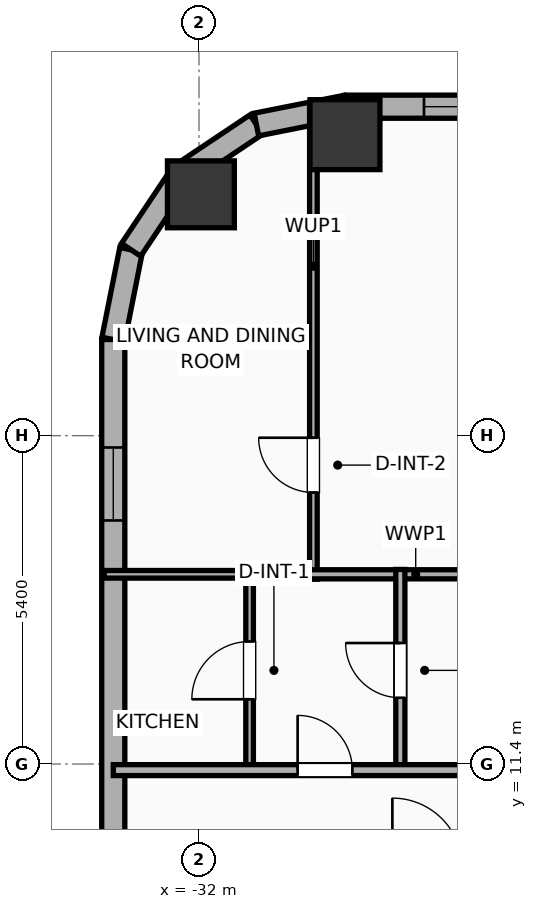
"""IFC4 building model, lengths in metres.
Left out: names, types, materials, properties, quantities, classifications, styles, units other than length and angle.
Written with IfcOpenShell. Run it as: python <this file> out.ifc"""

import sys

from ifc_helpers import new_model, si_unit, direction, frame, frame_2d, origin, origin_2d, place, context, subcontext, project, spatial, rectangle, hollow_rectangle, hollow_circle, extrude, element, fill, save


model = new_model("IFC4")
c1 = context("Model", 3, precision=1e-05, world=origin(), true_north=direction((0.0, 1.0)))
c2 = subcontext(c1, "Body", "Model", "MODEL_VIEW")
j1 = project(units=[si_unit("LENGTHUNIT", "METRE"), si_unit("PLANEANGLEUNIT", "RADIAN")], contexts=[c1])
p1 = place(None, origin())
s1 = spatial("IfcSite", under=j1, at=p1, CompositionType="ELEMENT")
p2 = place(p1, origin())
s2 = spatial("IfcBuilding", under=s1, at=p2, CompositionType="ELEMENT")
p3 = place(p2, frame((0.0, 0.0, 49.4)))
s3 = spatial("IfcBuildingStorey", under=s2, at=p3, CompositionType="ELEMENT", Elevation=49.4)
p4 = place(p3, frame((-29.6, 21.75, 0.0), z_axis=(0.0, 0.0, 1.0), x_axis=(1.0, 0.0, 0.0)))
e1 = element("IfcColumn", 1, at=p4, inside=s3, PredefinedType="COLUMN", context=c2, shape_type="SweptSolid", body=[
    extrude(hollow_rectangle(XDim=1.15, YDim=1.15, WallThickness=0.04, at=origin_2d()), origin(), (0.0, 0.0, 1.0), 3.9),
])
p5 = place(p3, frame((-31.969, 20.769, 0.0), z_axis=(0.0, 0.0, 1.0), x_axis=(1.0, 0.0, 0.0)))
e2 = element("IfcColumn", 2, at=p5, inside=s3, PredefinedType="COLUMN", context=c2, shape_type="SweptSolid", body=[
    extrude(hollow_circle(Radius=0.55, WallThickness=0.036, at=origin_2d()), origin(), (0.0, 0.0, 1.0), 3.9),
])
p6 = place(p3, frame((-33.41, -18.381, 0.0), z_axis=(0.0, 0.0, 1.0), x_axis=(0.0, 1.0, 0.0)))
e3 = element("IfcWall", 3, at=p6, inside=s3, PredefinedType="ELEMENTEDWALL", context=c2, shape_type="SweptSolid", body=[
    extrude(rectangle(XDim=36.763, YDim=0.38, at=frame_2d((18.381, 0.0))), origin(), (0.0, 0.0, 1.0), 3.65),
])
p7 = place(p6, frame((33.787, 0.0, 0.75)))
e4 = element("IfcOpeningElement", 4, at=p7, cuts=e3, PredefinedType="OPENING", context=c2, shape_type="SweptSolid", body=[
    extrude(rectangle(XDim=1.2, YDim=2.05, at=frame_2d((0.6, 1.025))), frame((0.0, 0.2, 0.0), z_axis=(0.0, -1.0, 0.0), x_axis=(1.0, 0.0, 0.0)), (0.0, 0.0, 1.0), 0.4),
])
p8 = place(p6, frame((22.726, 0.0, 0.75)))
e5 = element("IfcOpeningElement", 5, at=p8, cuts=e3, PredefinedType="OPENING", context=c2, shape_type="SweptSolid", body=[
    extrude(rectangle(XDim=1.2, YDim=2.05, at=frame_2d((0.6, 1.025))), frame((0.0, 0.2, 0.0), z_axis=(0.0, -1.0, 0.0), x_axis=(1.0, 0.0, 0.0)), (0.0, 0.0, 1.0), 0.4),
])
p9 = place(p6, frame((12.976, 0.0, 0.75)))
e6 = element("IfcOpeningElement", 6, at=p9, cuts=e3, PredefinedType="OPENING", context=c2, shape_type="SweptSolid", body=[
    extrude(rectangle(XDim=1.2, YDim=2.05, at=frame_2d((0.6, 1.025))), frame((0.0, 0.2, 0.0), z_axis=(0.0, -1.0, 0.0), x_axis=(1.0, 0.0, 0.0)), (0.0, 0.0, 1.0), 0.4),
])
p10 = place(p3, frame((-33.41, 18.381, 0.0), z_axis=(0.0, 0.0, 1.0), x_axis=(0.195086038585, 0.980786132421, 0.0)))
e7 = element("IfcWall", 7, at=p10, inside=s3, PredefinedType="ELEMENTEDWALL", context=c2, shape_type="SweptSolid", body=[
    extrude(rectangle(XDim=1.504, YDim=0.38, at=frame_2d((0.752, 0.0))), origin(), (0.0, 0.0, 1.0), 3.65),
])
p11 = place(p3, frame((-33.116, 19.857, 0.0), z_axis=(0.0, 0.0, 1.0), x_axis=(0.555572577804, 0.831468045563, 0.0)))
e8 = element("IfcWall", 8, at=p11, inside=s3, PredefinedType="ELEMENTEDWALL", context=c2, shape_type="SweptSolid", body=[
    extrude(rectangle(XDim=1.485, YDim=0.38, at=frame_2d((0.742, 0.0))), origin(), (0.0, 0.0, 1.0), 3.65),
])
p12 = place(p3, frame((-32.292, 21.091, 0.0), z_axis=(0.0, 0.0, 1.0), x_axis=(0.831442848281, 0.555610286119, 0.0)))
e9 = element("IfcWall", 9, at=p12, inside=s3, PredefinedType="ELEMENTEDWALL", context=c2, shape_type="SweptSolid", body=[
    extrude(rectangle(XDim=1.485, YDim=0.38, at=frame_2d((0.743, 0.0))), origin(), (0.0, 0.0, 1.0), 3.65),
])
p13 = place(p3, frame((-31.057, 21.917, 0.0), z_axis=(0.0, 0.0, 1.0), x_axis=(0.980786132421, 0.195086038585, 0.0)))
e10 = element("IfcWall", 10, at=p13, inside=s3, PredefinedType="ELEMENTEDWALL", context=c2, shape_type="SweptSolid", body=[
    extrude(rectangle(XDim=1.504, YDim=0.38, at=frame_2d((0.752, 0.0))), origin(), (0.0, 0.0, 1.0), 3.65),
])
p14 = place(p3, frame((-29.581, 22.21, 0.0), z_axis=(0.0, 0.0, 1.0), x_axis=(1.0, 0.0, 0.0)))
e11 = element("IfcWall", 11, at=p14, inside=s3, PredefinedType="ELEMENTEDWALL", context=c2, shape_type="SweptSolid", body=[
    extrude(rectangle(XDim=51.963, YDim=0.38, at=frame_2d((25.981, 0.0))), origin(), (0.0, 0.0, 1.0), 3.65),
])
p15 = place(p14, frame((6.61, 0.0, 0.75)))
e12 = element("IfcOpeningElement", 12, at=p15, cuts=e11, PredefinedType="OPENING", context=c2, shape_type="SweptSolid", body=[
    extrude(rectangle(XDim=2.4, YDim=2.1, at=frame_2d((1.2, 1.05))), frame((0.0, 0.2, 0.0), z_axis=(0.0, -1.0, 0.0), x_axis=(1.0, 0.0, 0.0)), (0.0, 0.0, 1.0), 0.4),
])
p16 = place(p14, frame((26.431, 0.0, 0.75)))
e13 = element("IfcOpeningElement", 13, at=p16, cuts=e11, PredefinedType="OPENING", context=c2, shape_type="SweptSolid", body=[
    extrude(rectangle(XDim=2.4, YDim=2.1, at=frame_2d((1.2, 1.05))), frame((0.0, 0.2, 0.0), z_axis=(0.0, -1.0, 0.0), x_axis=(1.0, 0.0, 0.0)), (0.0, 0.0, 1.0), 0.4),
])
p17 = place(p14, frame((43.752, 0.0, 0.75)))
e14 = element("IfcOpeningElement", 14, at=p17, cuts=e11, PredefinedType="OPENING", context=c2, shape_type="SweptSolid", body=[
    extrude(rectangle(XDim=2.4, YDim=2.1, at=frame_2d((1.2, 1.05))), frame((0.0, 0.2, 0.0), z_axis=(0.0, -1.0, 0.0), x_axis=(1.0, 0.0, 0.0)), (0.0, 0.0, 1.0), 0.4),
])
p18 = place(p14, frame((1.281, 0.0, 0.75)))
e15 = element("IfcOpeningElement", 15, at=p18, cuts=e11, PredefinedType="OPENING", context=c2, shape_type="SweptSolid", body=[
    extrude(rectangle(XDim=1.2, YDim=2.05, at=frame_2d((0.6, 1.025))), frame((0.0, 0.2, 0.0), z_axis=(0.0, -1.0, 0.0), x_axis=(1.0, 0.0, 0.0)), (0.0, 0.0, 1.0), 0.4),
])
p19 = place(p14, frame((3.922, 0.0, 0.75)))
e16 = element("IfcOpeningElement", 16, at=p19, cuts=e11, PredefinedType="OPENING", context=c2, shape_type="SweptSolid", body=[
    extrude(rectangle(XDim=1.2, YDim=2.05, at=frame_2d((0.6, 1.025))), frame((0.0, 0.2, 0.0), z_axis=(0.0, -1.0, 0.0), x_axis=(1.0, 0.0, 0.0)), (0.0, 0.0, 1.0), 0.4),
])
p20 = place(p14, frame((12.231, 0.0, 0.75)))
e17 = element("IfcOpeningElement", 17, at=p20, cuts=e11, PredefinedType="OPENING", context=c2, shape_type="SweptSolid", body=[
    extrude(rectangle(XDim=1.2, YDim=2.05, at=frame_2d((0.6, 1.025))), frame((0.0, 0.2, 0.0), z_axis=(0.0, -1.0, 0.0), x_axis=(1.0, 0.0, 0.0)), (0.0, 0.0, 1.0), 0.4),
])
p21 = place(p14, frame((18.805, 0.0, 0.75)))
e18 = element("IfcOpeningElement", 18, at=p21, cuts=e11, PredefinedType="OPENING", context=c2, shape_type="SweptSolid", body=[
    extrude(rectangle(XDim=1.2, YDim=2.05, at=frame_2d((0.6, 1.025))), frame((0.0, 0.2, 0.0), z_axis=(0.0, -1.0, 0.0), x_axis=(1.0, 0.0, 0.0)), (0.0, 0.0, 1.0), 0.4),
])
p22 = place(p14, frame((16.755, 0.0, 0.75)))
e19 = element("IfcOpeningElement", 19, at=p22, cuts=e11, PredefinedType="OPENING", context=c2, shape_type="SweptSolid", body=[
    extrude(rectangle(XDim=1.2, YDim=2.05, at=frame_2d((0.6, 1.025))), frame((0.0, 0.2, 0.0), z_axis=(0.0, -1.0, 0.0), x_axis=(1.0, 0.0, 0.0)), (0.0, 0.0, 1.0), 0.4),
])
p23 = place(p14, frame((23.776, 0.0, 0.75)))
e20 = element("IfcOpeningElement", 20, at=p23, cuts=e11, PredefinedType="OPENING", context=c2, shape_type="SweptSolid", body=[
    extrude(rectangle(XDim=1.2, YDim=2.05, at=frame_2d((0.6, 1.025))), frame((0.0, 0.2, 0.0), z_axis=(0.0, -1.0, 0.0), x_axis=(1.0, 0.0, 0.0)), (0.0, 0.0, 1.0), 0.4),
])
p24 = place(p14, frame((32.031, 0.0, 0.75)))
e21 = element("IfcOpeningElement", 21, at=p24, cuts=e11, PredefinedType="OPENING", context=c2, shape_type="SweptSolid", body=[
    extrude(rectangle(XDim=0.85, YDim=2.05, at=frame_2d((0.425, 1.025))), frame((0.0, 0.2, 0.0), z_axis=(0.0, -1.0, 0.0), x_axis=(1.0, 0.0, 0.0)), (0.0, 0.0, 1.0), 0.4),
])
p25 = place(p14, frame((34.276, 0.0, 0.75)))
e22 = element("IfcOpeningElement", 22, at=p25, cuts=e11, PredefinedType="OPENING", context=c2, shape_type="SweptSolid", body=[
    extrude(rectangle(XDim=1.2, YDim=2.05, at=frame_2d((0.6, 1.025))), frame((0.0, 0.2, 0.0), z_axis=(0.0, -1.0, 0.0), x_axis=(1.0, 0.0, 0.0)), (0.0, 0.0, 1.0), 0.4),
])
p26 = place(p14, frame((39.231, 0.0, 0.75)))
e23 = element("IfcOpeningElement", 23, at=p26, cuts=e11, PredefinedType="OPENING", context=c2, shape_type="SweptSolid", body=[
    extrude(rectangle(XDim=1.2, YDim=2.05, at=frame_2d((0.6, 1.025))), frame((0.0, 0.2, 0.0), z_axis=(0.0, -1.0, 0.0), x_axis=(1.0, 0.0, 0.0)), (0.0, 0.0, 1.0), 0.4),
])
p27 = place(p14, frame((47.676, 0.0, 0.75)))
e24 = element("IfcOpeningElement", 24, at=p27, cuts=e11, PredefinedType="OPENING", context=c2, shape_type="SweptSolid", body=[
    extrude(rectangle(XDim=1.2, YDim=2.05, at=frame_2d((0.6, 1.025))), frame((0.0, 0.2, 0.0), z_axis=(0.0, -1.0, 0.0), x_axis=(1.0, 0.0, 0.0)), (0.0, 0.0, 1.0), 0.4),
])
p28 = place(p14, frame((49.847, 0.0, 0.75)))
e25 = element("IfcOpeningElement", 25, at=p28, cuts=e11, PredefinedType="OPENING", context=c2, shape_type="SweptSolid", body=[
    extrude(rectangle(XDim=1.2, YDim=2.05, at=frame_2d((0.6, 1.025))), frame((0.0, 0.2, 0.0), z_axis=(0.0, -1.0, 0.0), x_axis=(1.0, 0.0, 0.0)), (0.0, 0.0, 1.0), 0.4),
])
p29 = place(p3, frame((-30.119, 14.44, 0.0), z_axis=(0.0, 0.0, 1.0), x_axis=(0.0, 1.0, 0.0)))
e26 = element("IfcWall", 26, at=p29, inside=s3, PredefinedType="PARTITIONING", context=c2, shape_type="SweptSolid", body=[
    extrude(rectangle(XDim=7.816, YDim=0.125, at=frame_2d((3.908, 0.0))), origin(), (0.0, 0.0, 1.0), 3.65),
])
p30 = place(p29, frame((1.426, 0.0, 0.0)))
e27 = element("IfcOpeningElement", 27, at=p30, cuts=e26, PredefinedType="OPENING", context=c2, shape_type="SweptSolid", body=[
    extrude(rectangle(XDim=0.9, YDim=2.05, at=frame_2d((0.45, 1.025))), frame((0.0, 0.073, 0.0), z_axis=(0.0, -1.0, 0.0), x_axis=(1.0, 0.0, 0.0)), (0.0, 0.0, 1.0), 0.145),
])
p31 = place(p3, frame((-30.239, 14.52, 0.0), z_axis=(0.0, 0.0, 1.0), x_axis=(1.0, 0.0, 0.0)))
e28 = element("IfcWall", 28, at=p31, inside=s3, PredefinedType="PLUMBINGWALL", context=c2, shape_type="SweptSolid", body=[
    extrude(rectangle(XDim=3.605, YDim=0.15, at=frame_2d((1.802, 0.0))), origin(), (0.0, 0.0, 1.0), 3.65),
])
p32 = place(p3, frame((-31.168, 11.28, 0.0), z_axis=(0.0, 0.0, 1.0), x_axis=(0.0, 1.0, 0.0)))
e29 = element("IfcWall", 29, at=p32, inside=s3, PredefinedType="PARTITIONING", context=c2, shape_type="SweptSolid", body=[
    extrude(rectangle(XDim=3.32, YDim=0.125, at=frame_2d((1.66, 0.0))), origin(), (0.0, 0.0, 1.0), 3.65),
])
p33 = place(p32, frame((1.185, 0.0, 0.0)))
e30 = element("IfcOpeningElement", 30, at=p33, cuts=e29, PredefinedType="OPENING", context=c2, shape_type="SweptSolid", body=[
    extrude(rectangle(XDim=0.95, YDim=2.05, at=frame_2d((0.475, 1.025))), frame((0.0, 0.073, 0.0), z_axis=(0.0, -1.0, 0.0), x_axis=(1.0, 0.0, 0.0)), (0.0, 0.0, 1.0), 0.145),
])
p34 = place(p3, frame((-33.56, 14.52, 0.0), z_axis=(0.0, 0.0, 1.0), x_axis=(1.0, 0.0, 0.0)))
e31 = element("IfcWall", 31, at=p34, inside=s3, PredefinedType="PARTITIONING", context=c2, shape_type="SweptSolid", body=[
    extrude(rectangle(XDim=2.512, YDim=0.125, at=frame_2d((1.256, 0.0))), origin(), (0.0, 0.0, 1.0), 3.65),
])
p35 = place(p3, frame((-28.689, 11.28, 0.0), z_axis=(0.0, 0.0, 1.0), x_axis=(0.0, 1.0, 0.0)))
e32 = element("IfcWall", 32, at=p35, inside=s3, PredefinedType="PLUMBINGWALL", context=c2, shape_type="SweptSolid", body=[
    extrude(rectangle(XDim=3.32, YDim=0.15, at=frame_2d((1.66, 0.0))), origin(), (0.0, 0.0, 1.0), 3.65),
])
p36 = place(p35, frame((1.21, 0.0, 0.0)))
e33 = element("IfcOpeningElement", 33, at=p36, cuts=e32, PredefinedType="OPENING", context=c2, shape_type="SweptSolid", body=[
    extrude(rectangle(XDim=0.9, YDim=2.05, at=frame_2d((0.45, 1.025))), frame((0.0, 0.085, 0.0), z_axis=(0.0, -1.0, 0.0), x_axis=(1.0, 0.0, 0.0)), (0.0, 0.0, 1.0), 0.17),
])
p37 = place(p3, frame((-33.41, 11.3, 0.0), z_axis=(0.0, 0.0, 1.0), x_axis=(1.0, 0.0, 0.0)))
e34 = element("IfcWall", 34, at=p37, inside=s3, PredefinedType="PARTITIONING", context=c2, shape_type="SweptSolid", body=[
    extrude(rectangle(XDim=59.62, YDim=0.18, at=frame_2d((29.81, 0.0))), origin(), (0.0, 0.0, 1.0), 3.65),
])
p38 = place(p37, frame((3.032, 0.0, 0.0)))
e35 = element("IfcOpeningElement", 35, at=p38, cuts=e34, PredefinedType="OPENING", context=c2, shape_type="SweptSolid", body=[
    extrude(rectangle(XDim=0.9, YDim=2.05, at=frame_2d((0.45, 1.025))), frame((0.0, 0.1, 0.0), z_axis=(0.0, -1.0, 0.0), x_axis=(1.0, 0.0, 0.0)), (0.0, 0.0, 1.0), 0.2),
])
p39 = place(p37, frame((9.769, 0.0, 0.0)))
e36 = element("IfcOpeningElement", 36, at=p39, cuts=e34, PredefinedType="OPENING", context=c2, shape_type="SweptSolid", body=[
    extrude(rectangle(XDim=0.9, YDim=2.05, at=frame_2d((0.45, 1.025))), frame((0.0, 0.1, 0.0), z_axis=(0.0, -1.0, 0.0), x_axis=(1.0, 0.0, 0.0)), (0.0, 0.0, 1.0), 0.2),
])
p40 = place(p37, frame((16.339, 0.0, 0.0)))
e37 = element("IfcOpeningElement", 37, at=p40, cuts=e34, PredefinedType="OPENING", context=c2, shape_type="SweptSolid", body=[
    extrude(rectangle(XDim=0.9, YDim=2.05, at=frame_2d((0.45, 1.025))), frame((0.0, 0.1, 0.0), z_axis=(0.0, -1.0, 0.0), x_axis=(1.0, 0.0, 0.0)), (0.0, 0.0, 1.0), 0.2),
])
p41 = place(p37, frame((23.827, 0.0, 0.0)))
e38 = element("IfcOpeningElement", 38, at=p41, cuts=e34, PredefinedType="OPENING", context=c2, shape_type="SweptSolid", body=[
    extrude(rectangle(XDim=1.15, YDim=2.05, at=frame_2d((0.575, 1.025))), frame((0.0, 0.1, 0.0), z_axis=(0.0, -1.0, 0.0), x_axis=(1.0, 0.0, 0.0)), (0.0, 0.0, 1.0), 0.2),
])
p42 = place(p37, frame((29.622, 0.0, 0.0)))
e39 = element("IfcOpeningElement", 39, at=p42, cuts=e34, PredefinedType="OPENING", context=c2, shape_type="SweptSolid", body=[
    extrude(rectangle(XDim=0.9, YDim=2.05, at=frame_2d((0.45, 1.025))), frame((0.0, 0.1, 0.0), z_axis=(0.0, -1.0, 0.0), x_axis=(1.0, 0.0, 0.0)), (0.0, 0.0, 1.0), 0.2),
])
p43 = place(p37, frame((36.628, 0.0, 0.0)))
e40 = element("IfcOpeningElement", 40, at=p43, cuts=e34, PredefinedType="OPENING", context=c2, shape_type="SweptSolid", body=[
    extrude(rectangle(XDim=0.9, YDim=2.05, at=frame_2d((0.45, 1.025))), frame((0.0, 0.1, 0.0), z_axis=(0.0, -1.0, 0.0), x_axis=(1.0, 0.0, 0.0)), (0.0, 0.0, 1.0), 0.2),
])
p44 = place(p37, frame((43.335, 0.0, 0.0)))
e41 = element("IfcOpeningElement", 41, at=p44, cuts=e34, PredefinedType="OPENING", context=c2, shape_type="SweptSolid", body=[
    extrude(rectangle(XDim=0.9, YDim=2.05, at=frame_2d((0.45, 1.025))), frame((0.0, 0.1, 0.0), z_axis=(0.0, -1.0, 0.0), x_axis=(1.0, 0.0, 0.0)), (0.0, 0.0, 1.0), 0.2),
])
p45 = place(p37, frame((48.307, 0.0, 0.0)))
e42 = element("IfcOpeningElement", 42, at=p45, cuts=e34, PredefinedType="OPENING", context=c2, shape_type="SweptSolid", body=[
    extrude(rectangle(XDim=1.15, YDim=2.05, at=frame_2d((0.575, 1.025))), frame((0.0, 0.1, 0.0), z_axis=(0.0, -1.0, 0.0), x_axis=(1.0, 0.0, 0.0)), (0.0, 0.0, 1.0), 0.2),
])
p46 = place(p37, frame((56.225, 0.0, 0.0)))
e43 = element("IfcOpeningElement", 43, at=p46, cuts=e34, PredefinedType="OPENING", context=c2, shape_type="SweptSolid", body=[
    extrude(rectangle(XDim=0.9, YDim=2.05, at=frame_2d((0.45, 1.025))), frame((0.0, 0.1, 0.0), z_axis=(0.0, -1.0, 0.0), x_axis=(1.0, 0.0, 0.0)), (0.0, 0.0, 1.0), 0.2),
])
p47 = place(p7, origin())
e44 = element("IfcWindow", 44, at=p47, inside=s3, PartitioningType="SINGLE_PANEL", PredefinedType="WINDOW", context=c2, shape_type="SweptSolid", body=[
    extrude(rectangle(XDim=1.2, YDim=2.05, at=frame_2d((0.6, 1.025))), frame((0.0, 0.03, 0.0), z_axis=(0.0, -1.0, 0.0), x_axis=(1.0, 0.0, 0.0)), (0.0, 0.0, 1.0), 0.06),
])
fill(e4, e44)
p48 = place(p18, origin())
e45 = element("IfcWindow", 45, at=p48, inside=s3, PartitioningType="SINGLE_PANEL", PredefinedType="WINDOW", context=c2, shape_type="SweptSolid", body=[
    extrude(rectangle(XDim=1.2, YDim=2.05, at=frame_2d((0.6, 1.025))), frame((0.0, 0.03, 0.0), z_axis=(0.0, -1.0, 0.0), x_axis=(1.0, 0.0, 0.0)), (0.0, 0.0, 1.0), 0.06),
])
fill(e15, e45)
p49 = place(p30, origin())
e46 = element("IfcDoor", 46, at=p49, inside=s3, OperationType="SINGLE_SWING_RIGHT", PredefinedType="DOOR", context=c2, shape_type="SweptSolid", body=[
    extrude(rectangle(XDim=0.9, YDim=2.05, at=frame_2d((0.45, 1.025))), frame((0.0, 0.025, 0.0), z_axis=(0.0, -1.0, 0.0), x_axis=(1.0, 0.0, 0.0)), (0.0, 0.0, 1.0), 0.05),
])
fill(e27, e46)
p50 = place(p33, origin())
e47 = element("IfcDoor", 47, at=p50, inside=s3, OperationType="SINGLE_SWING_LEFT", PredefinedType="DOOR", context=c2, shape_type="SweptSolid", body=[
    extrude(rectangle(XDim=0.95, YDim=2.05, at=frame_2d((0.475, 1.025))), frame((0.0, 0.025, 0.0), z_axis=(0.0, -1.0, 0.0), x_axis=(1.0, 0.0, 0.0)), (0.0, 0.0, 1.0), 0.05),
])
fill(e30, e47)
p51 = place(p36, origin())
e48 = element("IfcDoor", 48, at=p51, inside=s3, OperationType="SINGLE_SWING_RIGHT", PredefinedType="DOOR", context=c2, shape_type="SweptSolid", body=[
    extrude(rectangle(XDim=0.9, YDim=2.05, at=frame_2d((0.45, 1.025))), frame((0.0, 0.025, 0.0), z_axis=(0.0, -1.0, 0.0), x_axis=(1.0, 0.0, 0.0)), (0.0, 0.0, 1.0), 0.05),
])
fill(e33, e48)
p52 = place(p38, origin())
e49 = element("IfcDoor", 49, at=p52, inside=s3, OperationType="SINGLE_SWING_LEFT", PredefinedType="DOOR", context=c2, shape_type="SweptSolid", body=[
    extrude(rectangle(XDim=0.9, YDim=2.05, at=frame_2d((0.45, 1.025))), frame((0.0, 0.025, 0.0), z_axis=(0.0, -1.0, 0.0), x_axis=(1.0, 0.0, 0.0)), (0.0, 0.0, 1.0), 0.05),
])
fill(e35, e49)
save(model, sys.argv[1])
